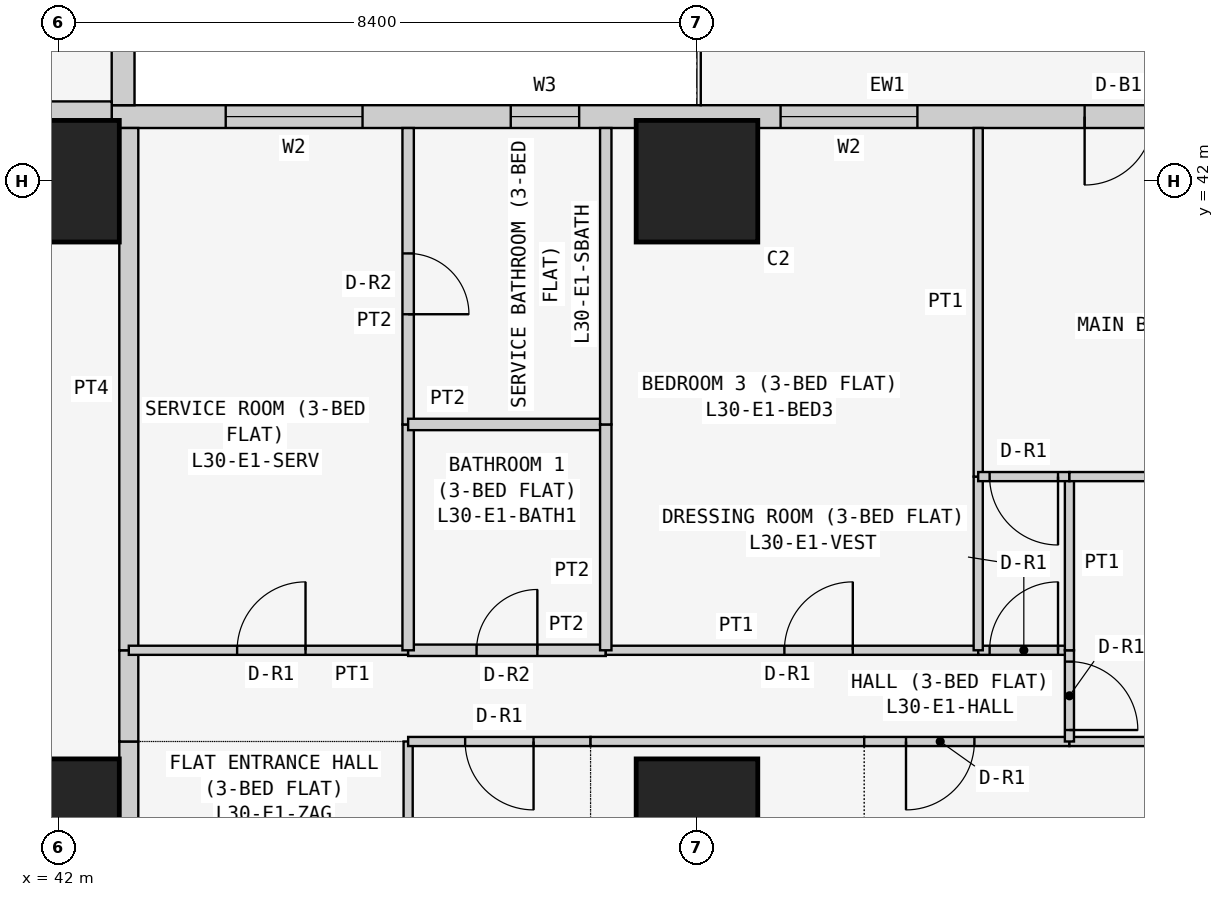
"""IFC4 building model, lengths in metres.
Left out: names, types, materials, properties, quantities, classifications, styles, units other than length and angle.
Written with IfcOpenShell. Run it as: python <this file> out.ifc"""

import sys

from ifc_helpers import new_model, si_unit, direction, frame, frame_2d, origin, origin_2d, place, context, subcontext, project, spatial, rectangle, extrude, element, fill, save


model = new_model("IFC4")
c1 = context("Model", 3, precision=1e-05, world=origin(), true_north=direction((0.0, 1.0)))
c2 = subcontext(c1, "Body", "Model", "MODEL_VIEW")
j1 = project(units=[si_unit("LENGTHUNIT", "METRE"), si_unit("PLANEANGLEUNIT", "RADIAN")], contexts=[c1])
p1 = place(None, origin())
s1 = spatial("IfcSite", under=j1, at=p1, CompositionType="ELEMENT")
p2 = place(p1, origin())
s2 = spatial("IfcBuilding", under=s1, at=p2, CompositionType="ELEMENT")
p3 = place(p2, frame((0.0, 0.0, 119.7)))
s3 = spatial("IfcBuildingStorey", under=s2, at=p3, CompositionType="ELEMENT", Elevation=119.7)
for number, where, z_axis, x_axis in (
    (1, (42.0, 33.6, 0.0), (0.0, 0.0, 1.0), (1.0, 0.0, 0.0)),
    (2, (42.0, 42.0, 0.0), (0.0, 0.0, 1.0), (1.0, 0.0, 0.0)),
    (3, (50.4, 33.6, 0.0), (0.0, 0.0, 1.0), (1.0, 0.0, 0.0)),
    (4, (50.4, 42.0, 0.0), (0.0, 0.0, 1.0), (1.0, 0.0, 0.0)),
):
    element("IfcColumn", number, at=place(p3, frame(where, z_axis=z_axis, x_axis=x_axis)), inside=s3, PredefinedType="COLUMN", context=c2, shape_type="SweptSolid", body=[
        extrude(rectangle(XDim=1.6, YDim=1.6, at=origin_2d()), origin(), (0.0, 0.0, 1.0), 3.6),
    ])
p4 = place(p3, frame((58.4, 42.85, 0.0), z_axis=(0.0, 0.0, 1.0), x_axis=(-1.0, 0.0, 0.0)))
e5 = element("IfcWall", 5, at=p4, inside=s3, PredefinedType="SOLIDWALL", context=c2, shape_type="SweptSolid", body=[
    extrude(rectangle(XDim=15.7, YDim=0.3, at=frame_2d((7.85, 0.0))), origin(), (0.0, 0.0, 1.0), 3.45),
])
p5 = place(p4, frame((12.4, 0.0, 0.9)))
e6 = element("IfcOpeningElement", 6, at=p5, cuts=e5, PredefinedType="OPENING", context=c2, shape_type="SweptSolid", body=[
    extrude(rectangle(XDim=1.8, YDim=1.5, at=frame_2d((0.9, 0.75))), frame((0.0, 0.16, 0.0), z_axis=(0.0, -1.0, 0.0), x_axis=(1.0, 0.0, 0.0)), (0.0, 0.0, 1.0), 0.32),
])
p6 = place(p4, frame((9.55, 0.0, 1.5)))
e7 = element("IfcOpeningElement", 7, at=p6, cuts=e5, PredefinedType="OPENING", context=c2, shape_type="SweptSolid", body=[
    extrude(rectangle(XDim=0.9, YDim=0.7, at=frame_2d((0.45, 0.35))), frame((0.0, 0.16, 0.0), z_axis=(0.0, -1.0, 0.0), x_axis=(1.0, 0.0, 0.0)), (0.0, 0.0, 1.0), 0.32),
])
p7 = place(p4, frame((5.1, 0.0, 0.9)))
e8 = element("IfcOpeningElement", 8, at=p7, cuts=e5, PredefinedType="OPENING", context=c2, shape_type="SweptSolid", body=[
    extrude(rectangle(XDim=1.8, YDim=1.5, at=frame_2d((0.9, 0.75))), frame((0.0, 0.16, 0.0), z_axis=(0.0, -1.0, 0.0), x_axis=(1.0, 0.0, 0.0)), (0.0, 0.0, 1.0), 0.32),
])
p8 = place(p4, frame((2.0, 0.0, 0.0)))
e9 = element("IfcOpeningElement", 9, at=p8, cuts=e5, PredefinedType="OPENING", context=c2, shape_type="SweptSolid", body=[
    extrude(rectangle(XDim=0.9, YDim=2.4, at=frame_2d((0.45, 1.2))), frame((0.0, 0.16, 0.0), z_axis=(0.0, -1.0, 0.0), x_axis=(1.0, 0.0, 0.0)), (0.0, 0.0, 1.0), 0.32),
])
p9 = place(p4, frame((0.7, 0.0, 0.9)))
e10 = element("IfcOpeningElement", 10, at=p9, cuts=e5, PredefinedType="OPENING", context=c2, shape_type="SweptSolid", body=[
    extrude(rectangle(XDim=1.2, YDim=1.5, at=frame_2d((0.6, 0.75))), frame((0.0, 0.16, 0.0), z_axis=(0.0, -1.0, 0.0), x_axis=(1.0, 0.0, 0.0)), (0.0, 0.0, 1.0), 0.32),
])
p10 = place(p3, frame((42.85, 43.0, 0.0), z_axis=(0.0, 0.0, 1.0), x_axis=(0.0, 1.0, 0.0)))
e11 = element("IfcWall", 11, at=p10, inside=s3, PredefinedType="SOLIDWALL", context=c2, shape_type="SweptSolid", body=[
    extrude(rectangle(XDim=7.0, YDim=0.3, at=frame_2d((3.5, 0.0))), origin(), (0.0, 0.0, 1.0), 3.45),
])
p11 = place(p10, frame((1.5, 0.0, 0.9)))
e12 = element("IfcOpeningElement", 12, at=p11, cuts=e11, PredefinedType="OPENING", context=c2, shape_type="SweptSolid", body=[
    extrude(rectangle(XDim=2.4, YDim=1.5, at=frame_2d((1.2, 0.75))), frame((0.0, 0.16, 0.0), z_axis=(0.0, -1.0, 0.0), x_axis=(1.0, 0.0, 0.0)), (0.0, 0.0, 1.0), 0.32),
])
p12 = place(p10, frame((5.05, 0.0, 0.9)))
e13 = element("IfcOpeningElement", 13, at=p12, cuts=e11, PredefinedType="OPENING", context=c2, shape_type="SweptSolid", body=[
    extrude(rectangle(XDim=1.2, YDim=1.5, at=frame_2d((0.6, 0.75))), frame((0.0, 0.16, 0.0), z_axis=(0.0, -1.0, 0.0), x_axis=(1.0, 0.0, 0.0)), (0.0, 0.0, 1.0), 0.32),
])
p13 = place(p3, frame((35.829, 42.925, 0.0), z_axis=(0.0, 0.0, 1.0), x_axis=(1.0, 0.0, 0.0)))
e14 = element("IfcWall", 14, at=p13, inside=s3, PredefinedType="PARTITIONING", context=c2, shape_type="SweptSolid", body=[
    extrude(rectangle(XDim=6.871, YDim=0.25, at=frame_2d((3.436, 0.0))), origin(), (0.0, 0.0, 1.0), 3.45),
])
p14 = place(p3, frame((42.925, 34.629, 0.0), z_axis=(0.0, 0.0, 1.0), x_axis=(0.0, -1.0, 0.0)))
e15 = element("IfcWall", 15, at=p14, inside=s3, PredefinedType="PARTITIONING", context=c2, shape_type="SweptSolid", body=[
    extrude(rectangle(XDim=5.229, YDim=0.25, at=frame_2d((2.615, 0.0))), origin(), (0.0, 0.0, 1.0), 3.45),
])
p15 = place(p14, frame((2.129, 0.0, 0.0)))
e16 = element("IfcOpeningElement", 16, at=p15, cuts=e15, PredefinedType="OPENING", context=c2, shape_type="SweptSolid", body=[
    extrude(rectangle(XDim=1.0, YDim=2.1, at=frame_2d((0.5, 1.05))), frame((0.0, 0.135, 0.0), z_axis=(0.0, -1.0, 0.0), x_axis=(1.0, 0.0, 0.0)), (0.0, 0.0, 1.0), 0.27),
])
p16 = place(p3, frame((42.925, 35.829, 0.0), z_axis=(0.0, 0.0, 1.0), x_axis=(0.0, -1.0, 0.0)))
e17 = element("IfcWall", 17, at=p16, inside=s3, PredefinedType="PARTITIONING", context=c2, shape_type="SweptSolid", body=[
    extrude(rectangle(XDim=1.2, YDim=0.25, at=frame_2d((0.6, 0.0))), origin(), (0.0, 0.0, 1.0), 3.45),
])
p17 = place(p3, frame((42.925, 42.7, 0.0), z_axis=(0.0, 0.0, 1.0), x_axis=(0.0, -1.0, 0.0)))
e18 = element("IfcWall", 18, at=p17, inside=s3, PredefinedType="PARTITIONING", context=c2, shape_type="SweptSolid", body=[
    extrude(rectangle(XDim=6.871, YDim=0.25, at=frame_2d((3.436, 0.0))), origin(), (0.0, 0.0, 1.0), 3.45),
])
p18 = place(p3, frame((46.6, 29.4, 0.0), z_axis=(0.0, 0.0, 1.0), x_axis=(0.0, 1.0, 0.0)))
e19 = element("IfcWall", 19, at=p18, inside=s3, PredefinedType="PARTITIONING", context=c2, shape_type="SweptSolid", body=[
    extrude(rectangle(XDim=5.229, YDim=0.12, at=frame_2d((2.615, 0.0))), origin(), (0.0, 0.0, 1.0), 3.45),
])
p19 = place(p3, frame((49.0, 34.629, 0.0), z_axis=(0.0, 0.0, 1.0), x_axis=(-1.0, 0.0, 0.0)))
e20 = element("IfcWall", 20, at=p19, inside=s3, PredefinedType="PARTITIONING", context=c2, shape_type="SweptSolid", body=[
    extrude(rectangle(XDim=2.4, YDim=0.12, at=frame_2d((1.2, 0.0))), origin(), (0.0, 0.0, 1.0), 3.45),
])
p20 = place(p19, frame((0.75, 0.0, 0.0)))
e21 = element("IfcOpeningElement", 21, at=p20, cuts=e20, PredefinedType="OPENING", context=c2, shape_type="SweptSolid", body=[
    extrude(rectangle(XDim=0.9, YDim=2.1, at=frame_2d((0.45, 1.05))), frame((0.0, 0.07, 0.0), z_axis=(0.0, -1.0, 0.0), x_axis=(1.0, 0.0, 0.0)), (0.0, 0.0, 1.0), 0.14),
])
p21 = place(p3, frame((52.6, 34.629, 0.0), z_axis=(0.0, 0.0, 1.0), x_axis=(-1.0, 0.0, 0.0)))
e22 = element("IfcWall", 22, at=p21, inside=s3, PredefinedType="PARTITIONING", context=c2, shape_type="SweptSolid", body=[
    extrude(rectangle(XDim=3.6, YDim=0.12, at=frame_2d((1.8, 0.0))), origin(), (0.0, 0.0, 1.0), 3.45),
])
p22 = place(p3, frame((55.3, 34.629, 0.0), z_axis=(0.0, 0.0, 1.0), x_axis=(-1.0, 0.0, 0.0)))
e23 = element("IfcWall", 23, at=p22, inside=s3, PredefinedType="PARTITIONING", context=c2, shape_type="SweptSolid", body=[
    extrude(rectangle(XDim=2.7, YDim=0.12, at=frame_2d((1.35, 0.0))), origin(), (0.0, 0.0, 1.0), 3.45),
])
p23 = place(p22, frame((1.25, 0.0, 0.0)))
e24 = element("IfcOpeningElement", 24, at=p23, cuts=e23, PredefinedType="OPENING", context=c2, shape_type="SweptSolid", body=[
    extrude(rectangle(XDim=0.9, YDim=2.1, at=frame_2d((0.45, 1.05))), frame((0.0, 0.07, 0.0), z_axis=(0.0, -1.0, 0.0), x_axis=(1.0, 0.0, 0.0)), (0.0, 0.0, 1.0), 0.14),
])
p24 = place(p3, frame((59.45, 34.629, 0.0), z_axis=(0.0, 0.0, 1.0), x_axis=(-1.0, 0.0, 0.0)))
e25 = element("IfcWall", 25, at=p24, inside=s3, PredefinedType="PARTITIONING", context=c2, shape_type="SweptSolid", body=[
    extrude(rectangle(XDim=4.15, YDim=0.12, at=frame_2d((2.075, 0.0))), origin(), (0.0, 0.0, 1.0), 3.45),
])
p25 = place(p3, frame((46.6, 35.829, 0.0), z_axis=(0.0, 0.0, 1.0), x_axis=(-1.0, 0.0, 0.0)))
e26 = element("IfcWall", 26, at=p25, inside=s3, PredefinedType="PARTITIONING", context=c2, shape_type="SweptSolid", body=[
    extrude(rectangle(XDim=3.675, YDim=0.12, at=frame_2d((1.837, 0.0))), origin(), (0.0, 0.0, 1.0), 3.45),
])
p26 = place(p25, frame((1.35, 0.0, 0.0)))
e27 = element("IfcOpeningElement", 27, at=p26, cuts=e26, PredefinedType="OPENING", context=c2, shape_type="SweptSolid", body=[
    extrude(rectangle(XDim=0.9, YDim=2.1, at=frame_2d((0.45, 1.05))), frame((0.0, 0.07, 0.0), z_axis=(0.0, -1.0, 0.0), x_axis=(1.0, 0.0, 0.0)), (0.0, 0.0, 1.0), 0.14),
])
p27 = place(p3, frame((49.2, 35.829, 0.0), z_axis=(0.0, 0.0, 1.0), x_axis=(-1.0, 0.0, 0.0)))
e28 = element("IfcWall", 28, at=p27, inside=s3, PredefinedType="PARTITIONING", context=c2, shape_type="SweptSolid", body=[
    extrude(rectangle(XDim=2.6, YDim=0.15, at=frame_2d((1.3, 0.0))), origin(), (0.0, 0.0, 1.0), 3.45),
])
p28 = place(p27, frame((0.9, 0.0, 0.0)))
e29 = element("IfcOpeningElement", 29, at=p28, cuts=e28, PredefinedType="OPENING", context=c2, shape_type="SweptSolid", body=[
    extrude(rectangle(XDim=0.8, YDim=2.1, at=frame_2d((0.4, 1.05))), frame((0.0, 0.085, 0.0), z_axis=(0.0, -1.0, 0.0), x_axis=(1.0, 0.0, 0.0)), (0.0, 0.0, 1.0), 0.17),
])
p29 = place(p3, frame((54.1, 35.829, 0.0), z_axis=(0.0, 0.0, 1.0), x_axis=(-1.0, 0.0, 0.0)))
e30 = element("IfcWall", 30, at=p29, inside=s3, PredefinedType="PARTITIONING", context=c2, shape_type="SweptSolid", body=[
    extrude(rectangle(XDim=4.9, YDim=0.12, at=frame_2d((2.45, 0.0))), origin(), (0.0, 0.0, 1.0), 3.45),
])
p30 = place(p29, frame((1.65, 0.0, 0.0)))
e31 = element("IfcOpeningElement", 31, at=p30, cuts=e30, PredefinedType="OPENING", context=c2, shape_type="SweptSolid", body=[
    extrude(rectangle(XDim=0.9, YDim=2.1, at=frame_2d((0.45, 1.05))), frame((0.0, 0.07, 0.0), z_axis=(0.0, -1.0, 0.0), x_axis=(1.0, 0.0, 0.0)), (0.0, 0.0, 1.0), 0.14),
])
p31 = place(p3, frame((55.3, 35.829, 0.0), z_axis=(0.0, 0.0, 1.0), x_axis=(-1.0, 0.0, 0.0)))
e32 = element("IfcWall", 32, at=p31, inside=s3, PredefinedType="PARTITIONING", context=c2, shape_type="SweptSolid", body=[
    extrude(rectangle(XDim=1.2, YDim=0.12, at=frame_2d((0.6, 0.0))), origin(), (0.0, 0.0, 1.0), 3.45),
])
p32 = place(p31, frame((0.15, 0.0, 0.0)))
e33 = element("IfcOpeningElement", 33, at=p32, cuts=e32, PredefinedType="OPENING", context=c2, shape_type="SweptSolid", body=[
    extrude(rectangle(XDim=0.9, YDim=2.1, at=frame_2d((0.45, 1.05))), frame((0.0, 0.07, 0.0), z_axis=(0.0, -1.0, 0.0), x_axis=(1.0, 0.0, 0.0)), (0.0, 0.0, 1.0), 0.14),
])
p33 = place(p3, frame((55.3, 34.629, 0.0), z_axis=(0.0, 0.0, 1.0), x_axis=(0.0, 1.0, 0.0)))
e34 = element("IfcWall", 34, at=p33, inside=s3, PredefinedType="PARTITIONING", context=c2, shape_type="SweptSolid", body=[
    extrude(rectangle(XDim=1.2, YDim=0.12, at=frame_2d((0.6, 0.0))), origin(), (0.0, 0.0, 1.0), 3.45),
])
p34 = place(p33, frame((0.151, 0.0, 0.0)))
e35 = element("IfcOpeningElement", 35, at=p34, cuts=e34, PredefinedType="OPENING", context=c2, shape_type="SweptSolid", body=[
    extrude(rectangle(XDim=0.9, YDim=2.1, at=frame_2d((0.45, 1.05))), frame((0.0, 0.07, 0.0), z_axis=(0.0, -1.0, 0.0), x_axis=(1.0, 0.0, 0.0)), (0.0, 0.0, 1.0), 0.14),
])
p35 = place(p3, frame((46.6, 35.829, 0.0), z_axis=(0.0, 0.0, 1.0), x_axis=(0.0, 1.0, 0.0)))
e36 = element("IfcWall", 36, at=p35, inside=s3, PredefinedType="PARTITIONING", context=c2, shape_type="SweptSolid", body=[
    extrude(rectangle(XDim=2.971, YDim=0.15, at=frame_2d((1.485, 0.0))), origin(), (0.0, 0.0, 1.0), 3.45),
])
p36 = place(p3, frame((46.6, 38.8, 0.0), z_axis=(0.0, 0.0, 1.0), x_axis=(0.0, 1.0, 0.0)))
e37 = element("IfcWall", 37, at=p36, inside=s3, PredefinedType="PARTITIONING", context=c2, shape_type="SweptSolid", body=[
    extrude(rectangle(XDim=3.9, YDim=0.15, at=frame_2d((1.95, 0.0))), origin(), (0.0, 0.0, 1.0), 3.45),
])
p37 = place(p36, frame((1.45, 0.0, 0.0)))
e38 = element("IfcOpeningElement", 38, at=p37, cuts=e37, PredefinedType="OPENING", context=c2, shape_type="SweptSolid", body=[
    extrude(rectangle(XDim=0.8, YDim=2.1, at=frame_2d((0.4, 1.05))), frame((0.0, 0.085, 0.0), z_axis=(0.0, -1.0, 0.0), x_axis=(1.0, 0.0, 0.0)), (0.0, 0.0, 1.0), 0.17),
])
p38 = place(p3, frame((49.2, 38.8, 0.0), z_axis=(0.0, 0.0, 1.0), x_axis=(-1.0, 0.0, 0.0)))
e39 = element("IfcWall", 39, at=p38, inside=s3, PredefinedType="PARTITIONING", context=c2, shape_type="SweptSolid", body=[
    extrude(rectangle(XDim=2.6, YDim=0.15, at=frame_2d((1.3, 0.0))), origin(), (0.0, 0.0, 1.0), 3.45),
])
p39 = place(p3, frame((49.2, 35.829, 0.0), z_axis=(0.0, 0.0, 1.0), x_axis=(0.0, 1.0, 0.0)))
e40 = element("IfcWall", 40, at=p39, inside=s3, PredefinedType="PARTITIONING", context=c2, shape_type="SweptSolid", body=[
    extrude(rectangle(XDim=2.971, YDim=0.15, at=frame_2d((1.485, 0.0))), origin(), (0.0, 0.0, 1.0), 3.45),
])
p40 = place(p3, frame((49.2, 38.8, 0.0), z_axis=(0.0, 0.0, 1.0), x_axis=(0.0, 1.0, 0.0)))
e41 = element("IfcWall", 41, at=p40, inside=s3, PredefinedType="PARTITIONING", context=c2, shape_type="SweptSolid", body=[
    extrude(rectangle(XDim=3.9, YDim=0.15, at=frame_2d((1.95, 0.0))), origin(), (0.0, 0.0, 1.0), 3.45),
])
p41 = place(p3, frame((54.1, 35.829, 0.0), z_axis=(0.0, 0.0, 1.0), x_axis=(0.0, 1.0, 0.0)))
e42 = element("IfcWall", 42, at=p41, inside=s3, PredefinedType="PARTITIONING", context=c2, shape_type="SweptSolid", body=[
    extrude(rectangle(XDim=2.285, YDim=0.12, at=frame_2d((1.143, 0.0))), origin(), (0.0, 0.0, 1.0), 3.45),
])
p42 = place(p3, frame((54.1, 38.114, 0.0), z_axis=(0.0, 0.0, 1.0), x_axis=(0.0, 1.0, 0.0)))
e43 = element("IfcWall", 43, at=p42, inside=s3, PredefinedType="PARTITIONING", context=c2, shape_type="SweptSolid", body=[
    extrude(rectangle(XDim=4.586, YDim=0.12, at=frame_2d((2.293, 0.0))), origin(), (0.0, 0.0, 1.0), 3.45),
])
p43 = place(p3, frame((55.3, 35.829, 0.0), z_axis=(0.0, 0.0, 1.0), x_axis=(0.0, 1.0, 0.0)))
e44 = element("IfcWall", 44, at=p43, inside=s3, PredefinedType="PARTITIONING", context=c2, shape_type="SweptSolid", body=[
    extrude(rectangle(XDim=2.285, YDim=0.12, at=frame_2d((1.143, 0.0))), origin(), (0.0, 0.0, 1.0), 3.45),
])
p44 = place(p3, frame((55.3, 38.114, 0.0), z_axis=(0.0, 0.0, 1.0), x_axis=(-1.0, 0.0, 0.0)))
e45 = element("IfcWall", 45, at=p44, inside=s3, PredefinedType="PARTITIONING", context=c2, shape_type="SweptSolid", body=[
    extrude(rectangle(XDim=1.2, YDim=0.12, at=frame_2d((0.6, 0.0))), origin(), (0.0, 0.0, 1.0), 3.45),
])
p45 = place(p44, frame((0.15, 0.0, 0.0)))
e46 = element("IfcOpeningElement", 46, at=p45, cuts=e45, PredefinedType="OPENING", context=c2, shape_type="SweptSolid", body=[
    extrude(rectangle(XDim=0.9, YDim=2.1, at=frame_2d((0.45, 1.05))), frame((0.0, 0.07, 0.0), z_axis=(0.0, -1.0, 0.0), x_axis=(1.0, 0.0, 0.0)), (0.0, 0.0, 1.0), 0.14),
])
p46 = place(p3, frame((59.45, 38.114, 0.0), z_axis=(0.0, 0.0, 1.0), x_axis=(-1.0, 0.0, 0.0)))
e47 = element("IfcWall", 47, at=p46, inside=s3, PredefinedType="PARTITIONING", context=c2, shape_type="SweptSolid", body=[
    extrude(rectangle(XDim=4.15, YDim=0.12, at=frame_2d((2.075, 0.0))), origin(), (0.0, 0.0, 1.0), 3.45),
])
p47 = place(p5, origin())
e48 = element("IfcWindow", 48, at=p47, inside=s3, PartitioningType="SINGLE_PANEL", PredefinedType="WINDOW", context=c2, shape_type="SweptSolid", body=[
    extrude(rectangle(XDim=1.8, YDim=1.5, at=frame_2d((0.9, 0.75))), frame((0.0, 0.03, 0.0), z_axis=(0.0, -1.0, 0.0), x_axis=(1.0, 0.0, 0.0)), (0.0, 0.0, 1.0), 0.06),
])
fill(e6, e48)
p48 = place(p6, origin())
e49 = element("IfcWindow", 49, at=p48, inside=s3, PartitioningType="SINGLE_PANEL", PredefinedType="WINDOW", context=c2, shape_type="SweptSolid", body=[
    extrude(rectangle(XDim=0.9, YDim=0.7, at=frame_2d((0.45, 0.35))), frame((0.0, 0.03, 0.0), z_axis=(0.0, -1.0, 0.0), x_axis=(1.0, 0.0, 0.0)), (0.0, 0.0, 1.0), 0.06),
])
fill(e7, e49)
p49 = place(p7, origin())
e50 = element("IfcWindow", 50, at=p49, inside=s3, PartitioningType="SINGLE_PANEL", PredefinedType="WINDOW", context=c2, shape_type="SweptSolid", body=[
    extrude(rectangle(XDim=1.8, YDim=1.5, at=frame_2d((0.9, 0.75))), frame((0.0, 0.03, 0.0), z_axis=(0.0, -1.0, 0.0), x_axis=(1.0, 0.0, 0.0)), (0.0, 0.0, 1.0), 0.06),
])
fill(e8, e50)
p50 = place(p8, origin())
e51 = element("IfcDoor", 51, at=p50, inside=s3, OperationType="SINGLE_SWING_RIGHT", PredefinedType="DOOR", context=c2, shape_type="SweptSolid", body=[
    extrude(rectangle(XDim=0.9, YDim=2.4, at=frame_2d((0.45, 1.2))), frame((0.0, 0.025, 0.0), z_axis=(0.0, -1.0, 0.0), x_axis=(1.0, 0.0, 0.0)), (0.0, 0.0, 1.0), 0.05),
])
fill(e9, e51)
p51 = place(p20, origin())
e52 = element("IfcDoor", 52, at=p51, inside=s3, OperationType="SINGLE_SWING_LEFT", PredefinedType="DOOR", context=c2, shape_type="SweptSolid", body=[
    extrude(rectangle(XDim=0.9, YDim=2.1, at=frame_2d((0.45, 1.05))), frame((0.0, 0.025, 0.0), z_axis=(0.0, -1.0, 0.0), x_axis=(1.0, 0.0, 0.0)), (0.0, 0.0, 1.0), 0.05),
])
fill(e21, e52)
p52 = place(p23, origin())
e53 = element("IfcDoor", 53, at=p52, inside=s3, OperationType="SINGLE_SWING_RIGHT", PredefinedType="DOOR", context=c2, shape_type="SweptSolid", body=[
    extrude(rectangle(XDim=0.9, YDim=2.1, at=frame_2d((0.45, 1.05))), frame((0.0, 0.025, 0.0), z_axis=(0.0, -1.0, 0.0), x_axis=(1.0, 0.0, 0.0)), (0.0, 0.0, 1.0), 0.05),
])
fill(e24, e53)
p53 = place(p26, frame((0.9, 0.0, 0.0), z_axis=(0.0, 0.0, 1.0), x_axis=(-1.0, 0.0, 0.0)))
e54 = element("IfcDoor", 54, at=p53, inside=s3, OperationType="SINGLE_SWING_RIGHT", PredefinedType="DOOR", context=c2, shape_type="SweptSolid", body=[
    extrude(rectangle(XDim=0.9, YDim=2.1, at=frame_2d((0.45, 1.05))), frame((0.0, 0.025, 0.0), z_axis=(0.0, -1.0, 0.0), x_axis=(1.0, 0.0, 0.0)), (0.0, 0.0, 1.0), 0.05),
])
fill(e27, e54)
p54 = place(p37, frame((0.8, 0.0, 0.0), z_axis=(0.0, 0.0, 1.0), x_axis=(-1.0, 0.0, 0.0)))
e55 = element("IfcDoor", 55, at=p54, inside=s3, OperationType="SINGLE_SWING_RIGHT", PredefinedType="DOOR", context=c2, shape_type="SweptSolid", body=[
    extrude(rectangle(XDim=0.8, YDim=2.1, at=frame_2d((0.4, 1.05))), frame((0.0, 0.025, 0.0), z_axis=(0.0, -1.0, 0.0), x_axis=(1.0, 0.0, 0.0)), (0.0, 0.0, 1.0), 0.05),
])
fill(e38, e55)
p55 = place(p28, frame((0.8, 0.0, 0.0), z_axis=(0.0, 0.0, 1.0), x_axis=(-1.0, 0.0, 0.0)))
e56 = element("IfcDoor", 56, at=p55, inside=s3, OperationType="SINGLE_SWING_RIGHT", PredefinedType="DOOR", context=c2, shape_type="SweptSolid", body=[
    extrude(rectangle(XDim=0.8, YDim=2.1, at=frame_2d((0.4, 1.05))), frame((0.0, 0.025, 0.0), z_axis=(0.0, -1.0, 0.0), x_axis=(1.0, 0.0, 0.0)), (0.0, 0.0, 1.0), 0.05),
])
fill(e29, e56)
p56 = place(p30, frame((0.9, 0.0, 0.0), z_axis=(0.0, 0.0, 1.0), x_axis=(-1.0, 0.0, 0.0)))
e57 = element("IfcDoor", 57, at=p56, inside=s3, OperationType="SINGLE_SWING_RIGHT", PredefinedType="DOOR", context=c2, shape_type="SweptSolid", body=[
    extrude(rectangle(XDim=0.9, YDim=2.1, at=frame_2d((0.45, 1.05))), frame((0.0, 0.025, 0.0), z_axis=(0.0, -1.0, 0.0), x_axis=(1.0, 0.0, 0.0)), (0.0, 0.0, 1.0), 0.05),
])
fill(e31, e57)
p57 = place(p32, frame((0.9, 0.0, 0.0), z_axis=(0.0, 0.0, 1.0), x_axis=(-1.0, 0.0, 0.0)))
e58 = element("IfcDoor", 58, at=p57, inside=s3, OperationType="SINGLE_SWING_RIGHT", PredefinedType="DOOR", context=c2, shape_type="SweptSolid", body=[
    extrude(rectangle(XDim=0.9, YDim=2.1, at=frame_2d((0.45, 1.05))), frame((0.0, 0.025, 0.0), z_axis=(0.0, -1.0, 0.0), x_axis=(1.0, 0.0, 0.0)), (0.0, 0.0, 1.0), 0.05),
])
fill(e33, e58)
p58 = place(p45, origin())
e59 = element("IfcDoor", 59, at=p58, inside=s3, OperationType="SINGLE_SWING_LEFT", PredefinedType="DOOR", context=c2, shape_type="SweptSolid", body=[
    extrude(rectangle(XDim=0.9, YDim=2.1, at=frame_2d((0.45, 1.05))), frame((0.0, 0.025, 0.0), z_axis=(0.0, -1.0, 0.0), x_axis=(1.0, 0.0, 0.0)), (0.0, 0.0, 1.0), 0.05),
])
fill(e46, e59)
p59 = place(p34, frame((0.9, 0.0, 0.0), z_axis=(0.0, 0.0, 1.0), x_axis=(-1.0, 0.0, 0.0)))
e60 = element("IfcDoor", 60, at=p59, inside=s3, OperationType="SINGLE_SWING_RIGHT", PredefinedType="DOOR", context=c2, shape_type="SweptSolid", body=[
    extrude(rectangle(XDim=0.9, YDim=2.1, at=frame_2d((0.45, 1.05))), frame((0.0, 0.025, 0.0), z_axis=(0.0, -1.0, 0.0), x_axis=(1.0, 0.0, 0.0)), (0.0, 0.0, 1.0), 0.05),
])
fill(e35, e60)
save(model, sys.argv[1])
